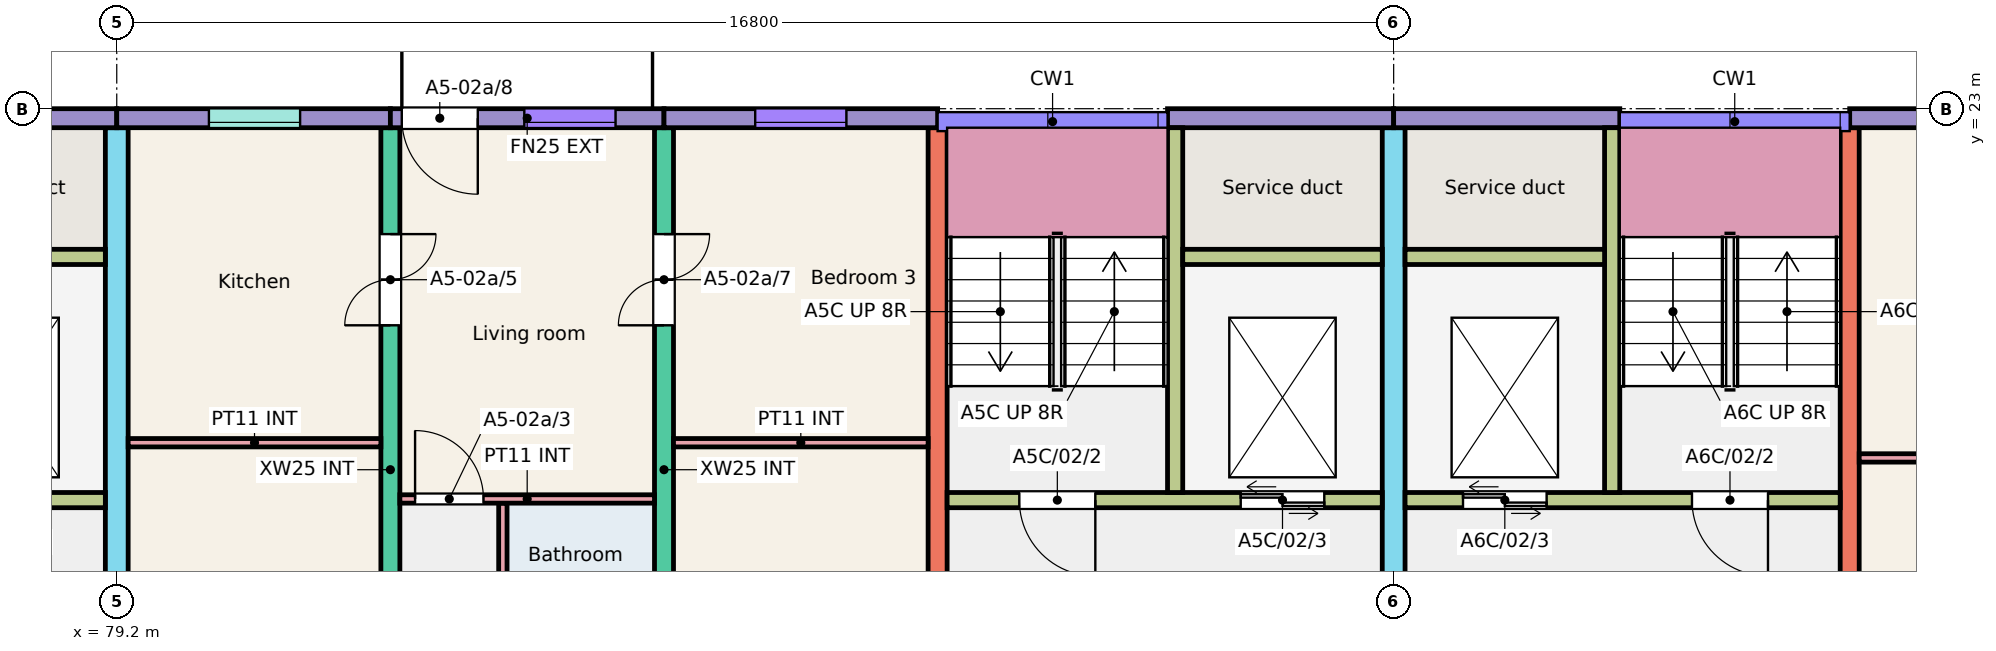
"""IFC4 building model, lengths in metres.
Left out: names, types, materials, properties, quantities, classifications, styles, units other than length and angle.
Written with IfcOpenShell. Run it as: python <this file> out.ifc"""

import sys

from ifc_helpers import new_model, si_unit, direction, frame, frame_2d, origin, place, context, subcontext, project, spatial, rectangle, extrude, element, fill, save


model = new_model("IFC4")
c1 = context("Model", 3, precision=1e-05, world=origin(), true_north=direction((0.0, 1.0)))
c2 = subcontext(c1, "Body", "Model", "MODEL_VIEW")
j1 = project(units=[si_unit("LENGTHUNIT", "METRE"), si_unit("PLANEANGLEUNIT", "RADIAN")], contexts=[c1])
p1 = place(None, origin())
s1 = spatial("IfcSite", under=j1, at=p1, CompositionType="ELEMENT")
p2 = place(p1, origin())
s2 = spatial("IfcBuilding", under=s1, at=p2, CompositionType="ELEMENT")
p3 = place(p2, frame((0.0, 0.0, 6.0)))
s3 = spatial("IfcBuildingStorey", under=s2, at=p3, CompositionType="ELEMENT", Elevation=6.0)
p4 = place(p3, frame((79.2, 11.75, 0.0), z_axis=(0.0, 0.0, 1.0), x_axis=(0.0, 1.0, 0.0)))
e1 = element("IfcWall", 1, at=p4, inside=s3, PredefinedType="SHEAR", context=c2, shape_type="SweptSolid", body=[
    extrude(rectangle(XDim=11.0, YDim=0.3, at=frame_2d((5.5, 0.0))), origin(), (0.0, 0.0, 1.0), 3.0),
])
p5 = place(p4, frame((0.3, 0.0, 0.0)))
e2 = element("IfcOpeningElement", 2, at=p5, cuts=e1, PredefinedType="OPENING", context=c2, shape_type="SweptSolid", body=[
    extrude(rectangle(XDim=1.2, YDim=2.1, at=frame_2d((0.6, 1.05))), frame((0.0, 0.16, 0.0), z_axis=(0.0, -1.0, 0.0), x_axis=(1.0, 0.0, 0.0)), (0.0, 0.0, 1.0), 0.32),
])
p6 = place(p3, frame((82.8, 13.75, 0.0), z_axis=(0.0, 0.0, 1.0), x_axis=(0.0, 1.0, 0.0)))
e3 = element("IfcWall", 3, at=p6, inside=s3, PredefinedType="SHEAR", context=c2, shape_type="SweptSolid", body=[
    extrude(rectangle(XDim=9.0, YDim=0.25, at=frame_2d((4.5, 0.0))), origin(), (0.0, 0.0, 1.0), 3.0),
])
p7 = place(p6, frame((0.175, 0.0, 0.0)))
e4 = element("IfcOpeningElement", 4, at=p7, cuts=e3, PredefinedType="OPENING", context=c2, shape_type="SweptSolid", body=[
    extrude(rectangle(XDim=1.2, YDim=2.1, at=frame_2d((0.6, 1.05))), frame((0.0, 0.135, 0.0), z_axis=(0.0, -1.0, 0.0), x_axis=(1.0, 0.0, 0.0)), (0.0, 0.0, 1.0), 0.27),
])
p8 = place(p6, frame((6.4, 0.0, 0.0)))
e5 = element("IfcOpeningElement", 5, at=p8, cuts=e3, PredefinedType="OPENING", context=c2, shape_type="SweptSolid", body=[
    extrude(rectangle(XDim=1.2, YDim=2.1, at=frame_2d((0.6, 1.05))), frame((0.0, 0.135, 0.0), z_axis=(0.0, -1.0, 0.0), x_axis=(1.0, 0.0, 0.0)), (0.0, 0.0, 1.0), 0.27),
])
p9 = place(p3, frame((86.4, 13.75, 0.0), z_axis=(0.0, 0.0, 1.0), x_axis=(0.0, 1.0, 0.0)))
e6 = element("IfcWall", 6, at=p9, inside=s3, PredefinedType="SHEAR", context=c2, shape_type="SweptSolid", body=[
    extrude(rectangle(XDim=9.0, YDim=0.25, at=frame_2d((4.5, 0.0))), origin(), (0.0, 0.0, 1.0), 3.0),
])
p10 = place(p9, frame((0.175, 0.0, 0.0)))
e7 = element("IfcOpeningElement", 7, at=p10, cuts=e6, PredefinedType="OPENING", context=c2, shape_type="SweptSolid", body=[
    extrude(rectangle(XDim=1.2, YDim=2.1, at=frame_2d((0.6, 1.05))), frame((0.0, 0.135, 0.0), z_axis=(0.0, -1.0, 0.0), x_axis=(1.0, 0.0, 0.0)), (0.0, 0.0, 1.0), 0.27),
])
p11 = place(p9, frame((6.4, 0.0, 0.0)))
e8 = element("IfcOpeningElement", 8, at=p11, cuts=e6, PredefinedType="OPENING", context=c2, shape_type="SweptSolid", body=[
    extrude(rectangle(XDim=1.2, YDim=2.1, at=frame_2d((0.6, 1.05))), frame((0.0, 0.135, 0.0), z_axis=(0.0, -1.0, 0.0), x_axis=(1.0, 0.0, 0.0)), (0.0, 0.0, 1.0), 0.27),
])
p12 = place(p3, frame((90.0, 13.75, 0.0), z_axis=(0.0, 0.0, 1.0), x_axis=(0.0, 1.0, 0.0)))
e9 = element("IfcWall", 9, at=p12, inside=s3, PredefinedType="SHEAR", context=c2, shape_type="SweptSolid", body=[
    extrude(rectangle(XDim=9.0, YDim=0.25, at=frame_2d((4.5, 0.0))), origin(), (0.0, 0.0, 1.0), 3.0),
])
p13 = place(p3, frame((96.0, 11.75, 0.0), z_axis=(0.0, 0.0, 1.0), x_axis=(0.0, 1.0, 0.0)))
e10 = element("IfcWall", 10, at=p13, inside=s3, PredefinedType="SHEAR", context=c2, shape_type="SweptSolid", body=[
    extrude(rectangle(XDim=11.0, YDim=0.3, at=frame_2d((5.5, 0.0))), origin(), (0.0, 0.0, 1.0), 3.0),
])
p14 = place(p13, frame((0.3, 0.0, 0.0)))
e11 = element("IfcOpeningElement", 11, at=p14, cuts=e10, PredefinedType="OPENING", context=c2, shape_type="SweptSolid", body=[
    extrude(rectangle(XDim=1.2, YDim=2.1, at=frame_2d((0.6, 1.05))), frame((0.0, 0.16, 0.0), z_axis=(0.0, -1.0, 0.0), x_axis=(1.0, 0.0, 0.0)), (0.0, 0.0, 1.0), 0.32),
])
p15 = place(p3, frame((102.0, 13.75, 0.0), z_axis=(0.0, 0.0, 1.0), x_axis=(0.0, 1.0, 0.0)))
e12 = element("IfcWall", 12, at=p15, inside=s3, PredefinedType="SHEAR", context=c2, shape_type="SweptSolid", body=[
    extrude(rectangle(XDim=9.0, YDim=0.25, at=frame_2d((4.5, 0.0))), origin(), (0.0, 0.0, 1.0), 3.0),
])
p16 = place(p3, frame((76.225, 22.875, 0.0), z_axis=(0.0, 0.0, 1.0), x_axis=(1.0, 0.0, 0.0)))
e13 = element("IfcWall", 13, at=p16, inside=s3, PredefinedType="SOLIDWALL", context=c2, shape_type="SweptSolid", body=[
    extrude(rectangle(XDim=2.975, YDim=0.25, at=frame_2d((1.487, 0.0))), origin(), (0.0, 0.0, 1.0), 3.0),
])
p17 = place(p3, frame((73.325, 17.85, 0.0), z_axis=(0.0, 0.0, 1.0), x_axis=(1.0, 0.0, 0.0)))
e14 = element("IfcWall", 14, at=p17, inside=s3, PredefinedType="SHEAR", context=c2, shape_type="SweptSolid", body=[
    extrude(rectangle(XDim=5.725, YDim=0.2, at=frame_2d((2.863, 0.0))), origin(), (0.0, 0.0, 1.0), 3.0),
])
p18 = place(p17, frame((0.95, 0.0, 0.0)))
e15 = element("IfcOpeningElement", 15, at=p18, cuts=e14, PredefinedType="OPENING", context=c2, shape_type="SweptSolid", body=[
    extrude(rectangle(XDim=1.0, YDim=2.1, at=frame_2d((0.5, 1.05))), frame((0.0, 0.11, 0.0), z_axis=(0.0, -1.0, 0.0), x_axis=(1.0, 0.0, 0.0)), (0.0, 0.0, 1.0), 0.22),
])
p19 = place(p17, frame((3.863, 0.0, 0.0)))
e16 = element("IfcOpeningElement", 16, at=p19, cuts=e14, PredefinedType="OPENING", context=c2, shape_type="SweptSolid", body=[
    extrude(rectangle(XDim=1.1, YDim=2.1, at=frame_2d((0.55, 1.05))), frame((0.0, 0.11, 0.0), z_axis=(0.0, -1.0, 0.0), x_axis=(1.0, 0.0, 0.0)), (0.0, 0.0, 1.0), 0.22),
])
p20 = place(p3, frame((76.425, 21.05, 0.0), z_axis=(0.0, 0.0, 1.0), x_axis=(1.0, 0.0, 0.0)))
e17 = element("IfcWall", 17, at=p20, inside=s3, PredefinedType="SHEAR", context=c2, shape_type="SweptSolid", body=[
    extrude(rectangle(XDim=2.625, YDim=0.2, at=frame_2d((1.312, 0.0))), origin(), (0.0, 0.0, 1.0), 3.0),
])
p21 = place(p3, frame((79.2, 22.875, 0.0), z_axis=(0.0, 0.0, 1.0), x_axis=(1.0, 0.0, 0.0)))
e18 = element("IfcWall", 18, at=p21, inside=s3, PredefinedType="SOLIDWALL", context=c2, shape_type="SweptSolid", body=[
    extrude(rectangle(XDim=3.6, YDim=0.25, at=frame_2d((1.8, 0.0))), origin(), (0.0, 0.0, 1.0), 3.0),
])
p22 = place(p21, frame((1.212, 0.0, 1.1)))
e19 = element("IfcOpeningElement", 19, at=p22, cuts=e18, PredefinedType="OPENING", context=c2, shape_type="SweptSolid", body=[
    extrude(rectangle(XDim=1.2, YDim=1.3, at=frame_2d((0.6, 0.65))), frame((0.0, 0.135, 0.0), z_axis=(0.0, -1.0, 0.0), x_axis=(1.0, 0.0, 0.0)), (0.0, 0.0, 1.0), 0.27),
])
p23 = place(p3, frame((82.8, 22.875, 0.0), z_axis=(0.0, 0.0, 1.0), x_axis=(1.0, 0.0, 0.0)))
e20 = element("IfcWall", 20, at=p23, inside=s3, PredefinedType="SOLIDWALL", context=c2, shape_type="SweptSolid", body=[
    extrude(rectangle(XDim=3.6, YDim=0.25, at=frame_2d((1.8, 0.0))), origin(), (0.0, 0.0, 1.0), 3.0),
])
p24 = place(p23, frame((1.762, 0.0, 0.8)))
e21 = element("IfcOpeningElement", 21, at=p24, cuts=e20, PredefinedType="OPENING", context=c2, shape_type="SweptSolid", body=[
    extrude(rectangle(XDim=1.2, YDim=1.6, at=frame_2d((0.6, 0.8))), frame((0.0, 0.135, 0.0), z_axis=(0.0, -1.0, 0.0), x_axis=(1.0, 0.0, 0.0)), (0.0, 0.0, 1.0), 0.27),
])
p25 = place(p23, frame((0.15, 0.0, 0.0)))
e22 = element("IfcOpeningElement", 22, at=p25, cuts=e20, PredefinedType="OPENING", context=c2, shape_type="SweptSolid", body=[
    extrude(rectangle(XDim=1.0, YDim=2.1, at=frame_2d((0.5, 1.05))), frame((0.0, 0.135, 0.0), z_axis=(0.0, -1.0, 0.0), x_axis=(1.0, 0.0, 0.0)), (0.0, 0.0, 1.0), 0.27),
])
p26 = place(p3, frame((86.4, 22.875, 0.0), z_axis=(0.0, 0.0, 1.0), x_axis=(1.0, 0.0, 0.0)))
e23 = element("IfcWall", 23, at=p26, inside=s3, PredefinedType="SOLIDWALL", context=c2, shape_type="SweptSolid", body=[
    extrude(rectangle(XDim=3.6, YDim=0.25, at=frame_2d((1.8, 0.0))), origin(), (0.0, 0.0, 1.0), 3.0),
])
p27 = place(p26, frame((1.2, 0.0, 0.8)))
e24 = element("IfcOpeningElement", 24, at=p27, cuts=e23, PredefinedType="OPENING", context=c2, shape_type="SweptSolid", body=[
    extrude(rectangle(XDim=1.2, YDim=1.6, at=frame_2d((0.6, 0.8))), frame((0.0, 0.135, 0.0), z_axis=(0.0, -1.0, 0.0), x_axis=(1.0, 0.0, 0.0)), (0.0, 0.0, 1.0), 0.27),
])
p28 = place(p3, frame((93.025, 22.875, 0.0), z_axis=(0.0, 0.0, 1.0), x_axis=(1.0, 0.0, 0.0)))
e25 = element("IfcWall", 25, at=p28, inside=s3, PredefinedType="SOLIDWALL", context=c2, shape_type="SweptSolid", body=[
    extrude(rectangle(XDim=2.975, YDim=0.25, at=frame_2d((1.488, 0.0))), origin(), (0.0, 0.0, 1.0), 3.0),
])
p29 = place(p3, frame((90.125, 17.85, 0.0), z_axis=(0.0, 0.0, 1.0), x_axis=(1.0, 0.0, 0.0)))
e26 = element("IfcWall", 26, at=p29, inside=s3, PredefinedType="SHEAR", context=c2, shape_type="SweptSolid", body=[
    extrude(rectangle(XDim=5.725, YDim=0.2, at=frame_2d((2.863, 0.0))), origin(), (0.0, 0.0, 1.0), 3.0),
])
p30 = place(p29, frame((0.95, 0.0, 0.0)))
e27 = element("IfcOpeningElement", 27, at=p30, cuts=e26, PredefinedType="OPENING", context=c2, shape_type="SweptSolid", body=[
    extrude(rectangle(XDim=1.0, YDim=2.1, at=frame_2d((0.5, 1.05))), frame((0.0, 0.11, 0.0), z_axis=(0.0, -1.0, 0.0), x_axis=(1.0, 0.0, 0.0)), (0.0, 0.0, 1.0), 0.22),
])
p31 = place(p29, frame((3.863, 0.0, 0.0)))
e28 = element("IfcOpeningElement", 28, at=p31, cuts=e26, PredefinedType="OPENING", context=c2, shape_type="SweptSolid", body=[
    extrude(rectangle(XDim=1.1, YDim=2.1, at=frame_2d((0.55, 1.05))), frame((0.0, 0.11, 0.0), z_axis=(0.0, -1.0, 0.0), x_axis=(1.0, 0.0, 0.0)), (0.0, 0.0, 1.0), 0.22),
])
p32 = place(p3, frame((93.125, 17.95, 0.0), z_axis=(0.0, 0.0, 1.0), x_axis=(0.0, 1.0, 0.0)))
e29 = element("IfcWall", 29, at=p32, inside=s3, PredefinedType="SHEAR", context=c2, shape_type="SweptSolid", body=[
    extrude(rectangle(XDim=4.8, YDim=0.2, at=frame_2d((2.4, 0.0))), origin(), (0.0, 0.0, 1.0), 3.0),
])
p33 = place(p3, frame((93.225, 21.05, 0.0), z_axis=(0.0, 0.0, 1.0), x_axis=(1.0, 0.0, 0.0)))
e30 = element("IfcWall", 30, at=p33, inside=s3, PredefinedType="SHEAR", context=c2, shape_type="SweptSolid", body=[
    extrude(rectangle(XDim=2.625, YDim=0.2, at=frame_2d((1.312, 0.0))), origin(), (0.0, 0.0, 1.0), 3.0),
])
p34 = place(p3, frame((96.0, 22.875, 0.0), z_axis=(0.0, 0.0, 1.0), x_axis=(1.0, 0.0, 0.0)))
e31 = element("IfcWall", 31, at=p34, inside=s3, PredefinedType="SOLIDWALL", context=c2, shape_type="SweptSolid", body=[
    extrude(rectangle(XDim=2.975, YDim=0.25, at=frame_2d((1.488, 0.0))), origin(), (0.0, 0.0, 1.0), 3.0),
])
p35 = place(p3, frame((96.15, 17.85, 0.0), z_axis=(0.0, 0.0, 1.0), x_axis=(1.0, 0.0, 0.0)))
e32 = element("IfcWall", 32, at=p35, inside=s3, PredefinedType="SHEAR", context=c2, shape_type="SweptSolid", body=[
    extrude(rectangle(XDim=5.725, YDim=0.2, at=frame_2d((2.863, 0.0))), origin(), (0.0, 0.0, 1.0), 3.0),
])
p36 = place(p35, frame((3.775, 0.0, 0.0)))
e33 = element("IfcOpeningElement", 33, at=p36, cuts=e32, PredefinedType="OPENING", context=c2, shape_type="SweptSolid", body=[
    extrude(rectangle(XDim=1.0, YDim=2.1, at=frame_2d((0.5, 1.05))), frame((0.0, 0.11, 0.0), z_axis=(0.0, -1.0, 0.0), x_axis=(1.0, 0.0, 0.0)), (0.0, 0.0, 1.0), 0.22),
])
p37 = place(p35, frame((0.762, 0.0, 0.0)))
e34 = element("IfcOpeningElement", 34, at=p37, cuts=e32, PredefinedType="OPENING", context=c2, shape_type="SweptSolid", body=[
    extrude(rectangle(XDim=1.1, YDim=2.1, at=frame_2d((0.55, 1.05))), frame((0.0, 0.11, 0.0), z_axis=(0.0, -1.0, 0.0), x_axis=(1.0, 0.0, 0.0)), (0.0, 0.0, 1.0), 0.22),
])
p38 = place(p3, frame((98.875, 17.95, 0.0), z_axis=(0.0, 0.0, 1.0), x_axis=(0.0, 1.0, 0.0)))
e35 = element("IfcWall", 35, at=p38, inside=s3, PredefinedType="SHEAR", context=c2, shape_type="SweptSolid", body=[
    extrude(rectangle(XDim=4.8, YDim=0.2, at=frame_2d((2.4, 0.0))), origin(), (0.0, 0.0, 1.0), 3.0),
])
p39 = place(p3, frame((96.15, 21.05, 0.0), z_axis=(0.0, 0.0, 1.0), x_axis=(1.0, 0.0, 0.0)))
e36 = element("IfcWall", 36, at=p39, inside=s3, PredefinedType="SHEAR", context=c2, shape_type="SweptSolid", body=[
    extrude(rectangle(XDim=2.625, YDim=0.2, at=frame_2d((1.312, 0.0))), origin(), (0.0, 0.0, 1.0), 3.0),
])
p40 = place(p3, frame((102.0, 22.875, 0.0), z_axis=(0.0, 0.0, 1.0), x_axis=(1.0, 0.0, 0.0)))
e37 = element("IfcWall", 37, at=p40, inside=s3, PredefinedType="SOLIDWALL", context=c2, shape_type="SweptSolid", body=[
    extrude(rectangle(XDim=3.6, YDim=0.25, at=frame_2d((1.8, 0.0))), origin(), (0.0, 0.0, 1.0), 3.0),
])
p41 = place(p40, frame((1.2, 0.0, 0.8)))
e38 = element("IfcOpeningElement", 38, at=p41, cuts=e37, PredefinedType="OPENING", context=c2, shape_type="SweptSolid", body=[
    extrude(rectangle(XDim=1.2, YDim=1.6, at=frame_2d((0.6, 0.8))), frame((0.0, 0.135, 0.0), z_axis=(0.0, -1.0, 0.0), x_axis=(1.0, 0.0, 0.0)), (0.0, 0.0, 1.0), 0.27),
])
p42 = place(p3, frame((84.28, 15.41, 0.0), z_axis=(0.0, 0.0, 1.0), x_axis=(0.0, 1.0, 0.0)))
e39 = element("IfcWall", 39, at=p42, inside=s3, PredefinedType="PARTITIONING", context=c2, shape_type="SweptSolid", body=[
    extrude(rectangle(XDim=2.4, YDim=0.11, at=frame_2d((1.2, 0.0))), origin(), (0.0, 0.0, 1.0), 2.8),
])
p43 = place(p3, frame((82.925, 17.865, 0.0), z_axis=(0.0, 0.0, 1.0), x_axis=(1.0, 0.0, 0.0)))
e40 = element("IfcWall", 40, at=p43, inside=s3, PredefinedType="PARTITIONING", context=c2, shape_type="SweptSolid", body=[
    extrude(rectangle(XDim=3.35, YDim=0.11, at=frame_2d((1.675, 0.0))), origin(), (0.0, 0.0, 1.0), 2.8),
])
p44 = place(p43, frame((0.2, 0.0, 0.0)))
e41 = element("IfcOpeningElement", 41, at=p44, cuts=e40, PredefinedType="OPENING", context=c2, shape_type="SweptSolid", body=[
    extrude(rectangle(XDim=0.9, YDim=2.1, at=frame_2d((0.45, 1.05))), frame((0.0, 0.065, 0.0), z_axis=(0.0, -1.0, 0.0), x_axis=(1.0, 0.0, 0.0)), (0.0, 0.0, 1.0), 0.13),
])
p45 = place(p3, frame((79.35, 18.605, 0.0), z_axis=(0.0, 0.0, 1.0), x_axis=(1.0, 0.0, 0.0)))
e42 = element("IfcWall", 42, at=p45, inside=s3, PredefinedType="PARTITIONING", context=c2, shape_type="SweptSolid", body=[
    extrude(rectangle(XDim=3.325, YDim=0.11, at=frame_2d((1.663, 0.0))), origin(), (0.0, 0.0, 1.0), 2.8),
])
for number, where, z_axis, x_axis in (
    (43, (86.525, 18.605, 0.0), (0.0, 0.0, 1.0), (1.0, 0.0, 0.0)),
    (44, (102.125, 18.405, 0.0), (0.0, 0.0, 1.0), (1.0, 0.0, 0.0)),
):
    element("IfcWall", number, at=place(p3, frame(where, z_axis=z_axis, x_axis=x_axis)), inside=s3, PredefinedType="PARTITIONING", context=c2, shape_type="SweptSolid", body=[
        extrude(rectangle(XDim=3.35, YDim=0.11, at=frame_2d((1.675, 0.0))), origin(), (0.0, 0.0, 1.0), 2.8),
    ])
p46 = place(p22, origin())
e45 = element("IfcWindow", 45, at=p46, inside=s3, PartitioningType="SINGLE_PANEL", PredefinedType="WINDOW", context=c2, shape_type="SweptSolid", body=[
    extrude(rectangle(XDim=1.2, YDim=1.3, at=frame_2d((0.6, 0.65))), frame((0.0, -0.025, 0.0), z_axis=(0.0, -1.0, 0.0), x_axis=(1.0, 0.0, 0.0)), (0.0, 0.0, 1.0), 0.06),
])
fill(e19, e45)
p47 = place(p27, origin())
e46 = element("IfcWindow", 46, at=p47, inside=s3, PartitioningType="SINGLE_PANEL", PredefinedType="WINDOW", context=c2, shape_type="SweptSolid", body=[
    extrude(rectangle(XDim=1.2, YDim=1.6, at=frame_2d((0.6, 0.8))), frame((0.0, -0.025, 0.0), z_axis=(0.0, -1.0, 0.0), x_axis=(1.0, 0.0, 0.0)), (0.0, 0.0, 1.0), 0.06),
])
fill(e24, e46)
p48 = place(p24, origin())
e47 = element("IfcWindow", 47, at=p48, inside=s3, PartitioningType="SINGLE_PANEL", PredefinedType="WINDOW", context=c2, shape_type="SweptSolid", body=[
    extrude(rectangle(XDim=1.2, YDim=1.6, at=frame_2d((0.6, 0.8))), frame((0.0, -0.025, 0.0), z_axis=(0.0, -1.0, 0.0), x_axis=(1.0, 0.0, 0.0)), (0.0, 0.0, 1.0), 0.06),
])
fill(e21, e47)
p49 = place(p44, origin())
e48 = element("IfcDoor", 48, at=p49, inside=s3, OperationType="SINGLE_SWING_LEFT", PredefinedType="DOOR", context=c2, shape_type="SweptSolid", body=[
    extrude(rectangle(XDim=0.9, YDim=2.1, at=frame_2d((0.45, 1.05))), frame((0.0, 0.025, 0.0), z_axis=(0.0, -1.0, 0.0), x_axis=(1.0, 0.0, 0.0)), (0.0, 0.0, 1.0), 0.05),
])
fill(e41, e48)
p50 = place(p8, origin())
e49 = element("IfcDoor", 49, at=p50, inside=s3, OperationType="DOUBLE_DOOR_SINGLE_SWING", PredefinedType="DOOR", context=c2, shape_type="SweptSolid", body=[
    extrude(rectangle(XDim=1.2, YDim=2.1, at=frame_2d((0.6, 1.05))), frame((0.0, 0.025, 0.0), z_axis=(0.0, -1.0, 0.0), x_axis=(1.0, 0.0, 0.0)), (0.0, 0.0, 1.0), 0.05),
])
fill(e5, e49)
p51 = place(p11, origin())
e50 = element("IfcDoor", 50, at=p51, inside=s3, OperationType="DOUBLE_DOOR_SINGLE_SWING", PredefinedType="DOOR", context=c2, shape_type="SweptSolid", body=[
    extrude(rectangle(XDim=1.2, YDim=2.1, at=frame_2d((0.6, 1.05))), frame((0.0, 0.025, 0.0), z_axis=(0.0, -1.0, 0.0), x_axis=(1.0, 0.0, 0.0)), (0.0, 0.0, 1.0), 0.05),
])
fill(e8, e50)
p52 = place(p25, origin())
e51 = element("IfcDoor", 51, at=p52, inside=s3, OperationType="SINGLE_SWING_RIGHT", PredefinedType="DOOR", context=c2, shape_type="SweptSolid", body=[
    extrude(rectangle(XDim=1.0, YDim=2.1, at=frame_2d((0.5, 1.05))), frame((0.0, 0.025, 0.0), z_axis=(0.0, -1.0, 0.0), x_axis=(1.0, 0.0, 0.0)), (0.0, 0.0, 1.0), 0.05),
])
fill(e22, e51)
p53 = place(p30, origin())
e52 = element("IfcDoor", 52, at=p53, inside=s3, OperationType="SINGLE_SWING_RIGHT", PredefinedType="DOOR", context=c2, shape_type="SweptSolid", body=[
    extrude(rectangle(XDim=1.0, YDim=2.1, at=frame_2d((0.5, 1.05))), frame((0.0, 0.025, 0.0), z_axis=(0.0, -1.0, 0.0), x_axis=(1.0, 0.0, 0.0)), (0.0, 0.0, 1.0), 0.05),
])
fill(e27, e52)
p54 = place(p31, origin())
e53 = element("IfcDoor", 53, at=p54, inside=s3, OperationType="DOUBLE_DOOR_SLIDING", PredefinedType="DOOR", context=c2, shape_type="SweptSolid", body=[
    extrude(rectangle(XDim=1.1, YDim=2.1, at=frame_2d((0.55, 1.05))), frame((0.0, 0.025, 0.0), z_axis=(0.0, -1.0, 0.0), x_axis=(1.0, 0.0, 0.0)), (0.0, 0.0, 1.0), 0.05),
])
fill(e28, e53)
p55 = place(p36, origin())
e54 = element("IfcDoor", 54, at=p55, inside=s3, OperationType="SINGLE_SWING_RIGHT", PredefinedType="DOOR", context=c2, shape_type="SweptSolid", body=[
    extrude(rectangle(XDim=1.0, YDim=2.1, at=frame_2d((0.5, 1.05))), frame((0.0, 0.025, 0.0), z_axis=(0.0, -1.0, 0.0), x_axis=(1.0, 0.0, 0.0)), (0.0, 0.0, 1.0), 0.05),
])
fill(e33, e54)
p56 = place(p37, origin())
e55 = element("IfcDoor", 55, at=p56, inside=s3, OperationType="DOUBLE_DOOR_SLIDING", PredefinedType="DOOR", context=c2, shape_type="SweptSolid", body=[
    extrude(rectangle(XDim=1.1, YDim=2.1, at=frame_2d((0.55, 1.05))), frame((0.0, 0.025, 0.0), z_axis=(0.0, -1.0, 0.0), x_axis=(1.0, 0.0, 0.0)), (0.0, 0.0, 1.0), 0.05),
])
fill(e34, e55)
save(model, sys.argv[1])
